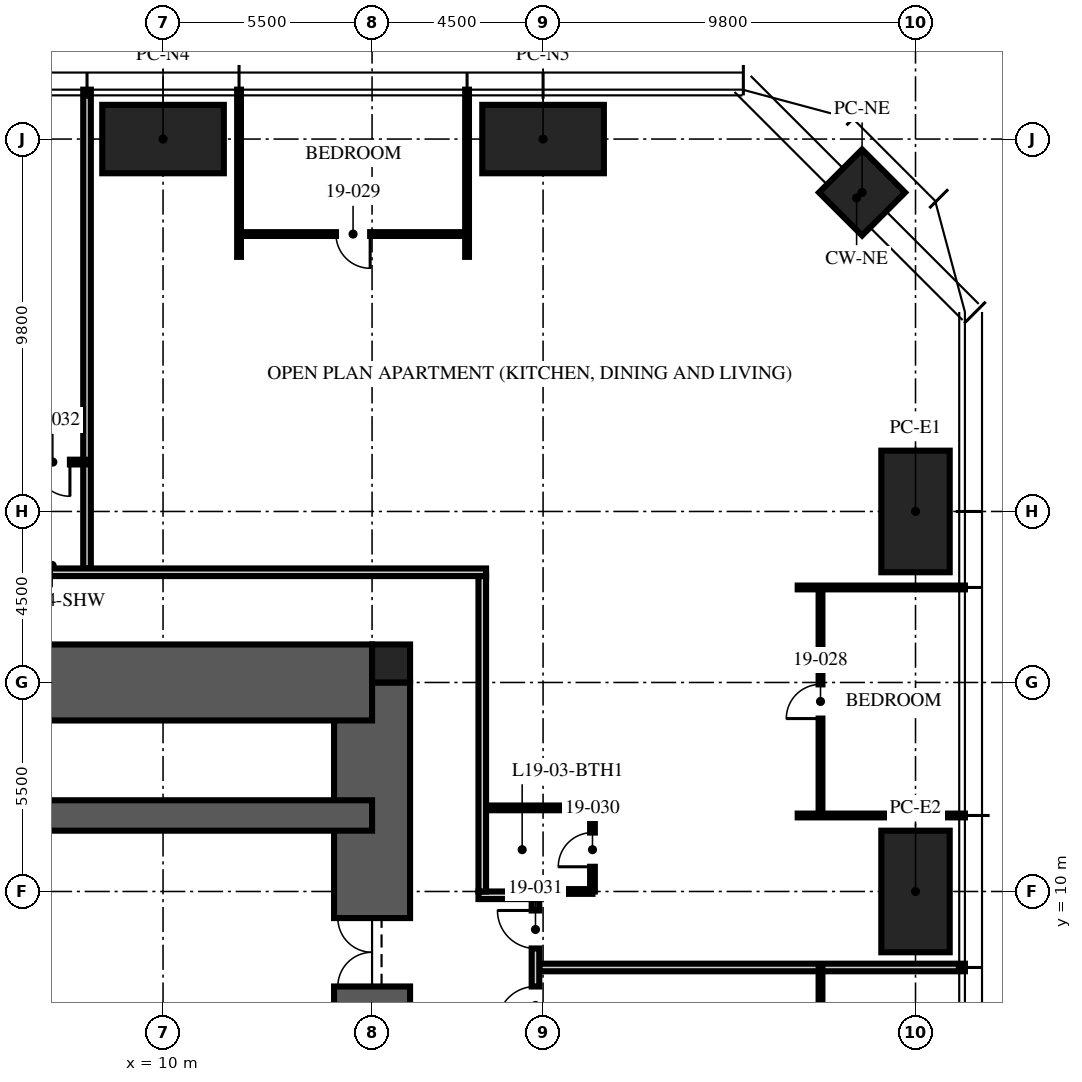
"""IFC4 building model, lengths in metres.
Left out: names, types, materials, properties, quantities, classifications, styles, units other than length and angle.
Written with IfcOpenShell. Run it as: python <this file> out.ifc"""

import sys

from ifc_helpers import new_model, si_unit, direction, frame, frame_2d, origin, origin_2d, place, context, subcontext, project, spatial, rectangle, hollow_rectangle, extrude, element, fill, save


model = new_model("IFC4")
c1 = context("Model", 3, precision=1e-05, world=origin(), true_north=direction((0.0, 1.0)))
c2 = subcontext(c1, "Body", "Model", "MODEL_VIEW")
j1 = project(units=[si_unit("LENGTHUNIT", "METRE"), si_unit("PLANEANGLEUNIT", "RADIAN")], contexts=[c1])
p1 = place(None, origin())
s1 = spatial("IfcSite", under=j1, at=p1, CompositionType="ELEMENT")
p2 = place(p1, origin())
s2 = spatial("IfcBuilding", under=s1, at=p2, CompositionType="ELEMENT")
p3 = place(p2, frame((0.0, 0.0, 77.25)))
s3 = spatial("IfcBuildingStorey", under=s2, at=p3, CompositionType="ELEMENT", Elevation=77.25)
p4 = place(p3, frame((15.5, -15.5, -0.25), z_axis=(0.0, 0.0, 1.0), x_axis=(0.0, 1.0, 0.0)))
e1 = element("IfcWall", 1, at=p4, inside=s3, PredefinedType="SHEAR", context=c2, shape_type="SweptSolid", body=[
    extrude(rectangle(XDim=31.0, YDim=2.0, at=frame_2d((15.5, 0.0))), origin(), (0.0, 0.0, 1.0), 3.75),
])
p5 = place(p4, frame((6.5, 0.0, 0.25)))
e2 = element("IfcOpeningElement", 2, at=p5, cuts=e1, PredefinedType="OPENING", context=c2, shape_type="SweptSolid", body=[
    extrude(rectangle(XDim=1.2, YDim=2.1, at=frame_2d((0.6, 1.05))), frame((0.0, 1.01, 0.0), z_axis=(0.0, -1.0, 0.0), x_axis=(1.0, 0.0, 0.0)), (0.0, 0.0, 1.0), 2.02),
])
p6 = place(p4, frame((23.0, 0.0, 0.25)))
e3 = element("IfcOpeningElement", 3, at=p6, cuts=e1, PredefinedType="OPENING", context=c2, shape_type="SweptSolid", body=[
    extrude(rectangle(XDim=1.8, YDim=2.1, at=frame_2d((0.9, 1.05))), frame((0.0, 1.01, 0.0), z_axis=(0.0, -1.0, 0.0), x_axis=(1.0, 0.0, 0.0)), (0.0, 0.0, 1.0), 2.02),
])
p7 = place(p3, frame((-15.5, 15.5, -0.25), z_axis=(0.0, 0.0, 1.0), x_axis=(1.0, 0.0, 0.0)))
e4 = element("IfcWall", 4, at=p7, inside=s3, PredefinedType="SHEAR", context=c2, shape_type="SweptSolid", body=[
    extrude(rectangle(XDim=31.0, YDim=2.0, at=frame_2d((15.5, 0.0))), origin(), (0.0, 0.0, 1.0), 3.75),
])
p8 = place(p7, frame((10.4, 0.0, 0.25)))
e5 = element("IfcOpeningElement", 5, at=p8, cuts=e4, PredefinedType="OPENING", context=c2, shape_type="SweptSolid", body=[
    extrude(rectangle(XDim=1.1, YDim=2.1, at=frame_2d((0.55, 1.05))), frame((0.0, 1.01, 0.0), z_axis=(0.0, -1.0, 0.0), x_axis=(1.0, 0.0, 0.0)), (0.0, 0.0, 1.0), 2.02),
])
p9 = place(p7, frame((13.5, 0.0, 0.25)))
e6 = element("IfcOpeningElement", 6, at=p9, cuts=e4, PredefinedType="OPENING", context=c2, shape_type="SweptSolid", body=[
    extrude(rectangle(XDim=1.1, YDim=2.1, at=frame_2d((0.55, 1.05))), frame((0.0, 1.01, 0.0), z_axis=(0.0, -1.0, 0.0), x_axis=(1.0, 0.0, 0.0)), (0.0, 0.0, 1.0), 2.02),
])
p10 = place(p7, frame((16.6, 0.0, 0.25)))
e7 = element("IfcOpeningElement", 7, at=p10, cuts=e4, PredefinedType="OPENING", context=c2, shape_type="SweptSolid", body=[
    extrude(rectangle(XDim=1.1, YDim=2.1, at=frame_2d((0.55, 1.05))), frame((0.0, 1.01, 0.0), z_axis=(0.0, -1.0, 0.0), x_axis=(1.0, 0.0, 0.0)), (0.0, 0.0, 1.0), 2.02),
])
p11 = place(p3, frame((-15.5, 12.0, -0.25), z_axis=(0.0, 0.0, 1.0), x_axis=(1.0, 0.0, 0.0)))
e8 = element("IfcWall", 8, at=p11, inside=s3, PredefinedType="SHEAR", context=c2, shape_type="SweptSolid", body=[
    extrude(rectangle(XDim=31.0, YDim=0.8, at=frame_2d((15.5, 0.0))), origin(), (0.0, 0.0, 1.0), 3.75),
])
p12 = place(p3, frame((16.0, 16.0, -0.25), z_axis=(0.0, 0.0, 1.0), x_axis=(1.0, 0.0, 0.0)))
e9 = element("IfcColumn", 9, at=p12, inside=s3, PredefinedType="COLUMN", context=c2, shape_type="SweptSolid", body=[
    extrude(rectangle(XDim=1.0, YDim=1.0, at=origin_2d()), origin(), (0.0, 0.0, 1.0), 3.75),
])
for number, where, z_axis, x_axis in (
    (10, (10.0, 29.8, 0.0), (0.0, 0.0, 1.0), (1.0, 0.0, 0.0)),
    (11, (20.0, 29.8, 0.0), (0.0, 0.0, 1.0), (1.0, 0.0, 0.0)),
    (12, (29.8, 20.0, 0.0), (0.0, 0.0, 1.0), (0.0, 1.0, 0.0)),
    (13, (29.8, 10.0, 0.0), (0.0, 0.0, 1.0), (0.0, 1.0, 0.0)),
):
    element("IfcColumn", number, at=place(p3, frame(where, z_axis=z_axis, x_axis=x_axis)), inside=s3, PredefinedType="COLUMN", context=c2, shape_type="SweptSolid", body=[
        extrude(hollow_rectangle(XDim=3.2, YDim=1.8, WallThickness=0.2, at=origin_2d()), origin(), (0.0, 0.0, 1.0), 3.75),
    ])
p13 = place(p3, frame((28.394, 28.394, 0.0), z_axis=(0.0, 0.0, 1.0), x_axis=(0.707106781187, -0.707106781187, 0.0)))
e14 = element("IfcColumn", 14, at=p13, inside=s3, PredefinedType="COLUMN", context=c2, shape_type="SweptSolid", body=[
    extrude(hollow_rectangle(XDim=1.6, YDim=1.6, WallThickness=0.1, at=origin_2d()), origin(), (0.0, 0.0, 1.0), 3.75),
])
p14 = place(p3, frame((19.9, 8.0, 0.0), z_axis=(0.0, 0.0, 1.0), x_axis=(1.0, 0.0, 0.0)))
e15 = element("IfcWall", 15, at=p14, inside=s3, PredefinedType="PARTITIONING", context=c2, shape_type="SweptSolid", body=[
    extrude(rectangle(XDim=11.2, YDim=0.2, at=frame_2d((5.6, 0.0))), origin(), (0.0, 0.0, 1.0), 2.71),
])
for number, where, z_axis, x_axis in (
    (16, (26.7, 12.0, 0.0), (0.0, 0.0, 1.0), (1.0, 0.0, 0.0)),
    (17, (26.7, 18.0, 0.0), (0.0, 0.0, 1.0), (1.0, 0.0, 0.0)),
    (18, (18.0, 26.7, 0.0), (0.0, 0.0, 1.0), (0.0, 1.0, 0.0)),
    (19, (12.0, 26.7, 0.0), (0.0, 0.0, 1.0), (0.0, 1.0, 0.0)),
):
    element("IfcWall", number, at=place(p3, frame(where, z_axis=z_axis, x_axis=x_axis)), inside=s3, PredefinedType="PARTITIONING", context=c2, shape_type="SweptSolid", body=[
        extrude(rectangle(XDim=4.4, YDim=0.1, at=frame_2d((2.2, 0.0))), origin(), (0.0, 0.0, 1.0), 2.71),
    ])
p15 = place(p3, frame((8.0, 18.5, 0.0), z_axis=(0.0, 0.0, 1.0), x_axis=(0.0, 1.0, 0.0)))
e20 = element("IfcWall", 20, at=p15, inside=s3, PredefinedType="PARTITIONING", context=c2, shape_type="SweptSolid", body=[
    extrude(rectangle(XDim=12.6, YDim=0.2, at=frame_2d((6.3, 0.0))), origin(), (0.0, 0.0, 1.0), 2.71),
])
p16 = place(p3, frame((27.3, 2.0, 0.0), z_axis=(0.0, 0.0, 1.0), x_axis=(0.0, 1.0, 0.0)))
e21 = element("IfcWall", 21, at=p16, inside=s3, PredefinedType="PARTITIONING", context=c2, shape_type="SweptSolid", body=[
    extrude(rectangle(XDim=6.0, YDim=0.1, at=frame_2d((3.0, 0.0))), origin(), (0.0, 0.0, 1.0), 2.61),
])
p17 = place(p16, frame((2.55, 0.0, 0.0)))
e22 = element("IfcOpeningElement", 22, at=p17, cuts=e21, PredefinedType="OPENING", context=c2, shape_type="SweptSolid", body=[
    extrude(rectangle(XDim=0.9, YDim=2.1, at=frame_2d((0.45, 1.05))), frame((0.0, 0.06, 0.0), z_axis=(0.0, -1.0, 0.0), x_axis=(1.0, 0.0, 0.0)), (0.0, 0.0, 1.0), 0.12),
])
p18 = place(p3, frame((27.3, 12.0, 0.0), z_axis=(0.0, 0.0, 1.0), x_axis=(0.0, 1.0, 0.0)))
e23 = element("IfcWall", 23, at=p18, inside=s3, PredefinedType="PARTITIONING", context=c2, shape_type="SweptSolid", body=[
    extrude(rectangle(XDim=6.0, YDim=0.1, at=frame_2d((3.0, 0.0))), origin(), (0.0, 0.0, 1.0), 2.61),
])
p19 = place(p18, frame((2.55, 0.0, 0.0)))
e24 = element("IfcOpeningElement", 24, at=p19, cuts=e23, PredefinedType="OPENING", context=c2, shape_type="SweptSolid", body=[
    extrude(rectangle(XDim=0.9, YDim=2.1, at=frame_2d((0.45, 1.05))), frame((0.0, 0.06, 0.0), z_axis=(0.0, -1.0, 0.0), x_axis=(1.0, 0.0, 0.0)), (0.0, 0.0, 1.0), 0.12),
])
p20 = place(p3, frame((18.0, 27.3, 0.0), z_axis=(0.0, 0.0, 1.0), x_axis=(-1.0, 0.0, 0.0)))
e25 = element("IfcWall", 25, at=p20, inside=s3, PredefinedType="PARTITIONING", context=c2, shape_type="SweptSolid", body=[
    extrude(rectangle(XDim=6.0, YDim=0.1, at=frame_2d((3.0, 0.0))), origin(), (0.0, 0.0, 1.0), 2.61),
])
p21 = place(p20, frame((2.55, 0.0, 0.0)))
e26 = element("IfcOpeningElement", 26, at=p21, cuts=e25, PredefinedType="OPENING", context=c2, shape_type="SweptSolid", body=[
    extrude(rectangle(XDim=0.9, YDim=2.1, at=frame_2d((0.45, 1.05))), frame((0.0, 0.06, 0.0), z_axis=(0.0, -1.0, 0.0), x_axis=(1.0, 0.0, 0.0)), (0.0, 0.0, 1.0), 0.12),
])
p22 = place(p3, frame((21.3, 10.0, 0.0), z_axis=(0.0, 0.0, 1.0), x_axis=(0.0, 1.0, 0.0)))
e27 = element("IfcWall", 27, at=p22, inside=s3, PredefinedType="PARTITIONING", context=c2, shape_type="SweptSolid", body=[
    extrude(rectangle(XDim=2.2, YDim=0.125, at=frame_2d((1.1, 0.0))), origin(), (0.0, 0.0, 1.0), 2.492),
])
p23 = place(p22, frame((0.65, 0.0, 0.0)))
e28 = element("IfcOpeningElement", 28, at=p23, cuts=e27, PredefinedType="OPENING", context=c2, shape_type="SweptSolid", body=[
    extrude(rectangle(XDim=0.9, YDim=2.1, at=frame_2d((0.45, 1.05))), frame((0.0, 0.073, 0.0), z_axis=(0.0, -1.0, 0.0), x_axis=(1.0, 0.0, 0.0)), (0.0, 0.0, 1.0), 0.145),
])
p24 = place(p3, frame((19.97, 10.0, 0.0), z_axis=(0.0, 0.0, 1.0), x_axis=(1.0, 0.0, 0.0)))
e29 = element("IfcWall", 29, at=p24, inside=s3, PredefinedType="PARTITIONING", context=c2, shape_type="SweptSolid", body=[
    extrude(rectangle(XDim=1.33, YDim=0.125, at=frame_2d((0.665, 0.0))), origin(), (0.0, 0.0, 1.0), 2.492),
])
p25 = place(p3, frame((18.5, 12.2, 0.0), z_axis=(0.0, 0.0, 1.0), x_axis=(1.0, 0.0, 0.0)))
e30 = element("IfcWall", 30, at=p25, inside=s3, PredefinedType="PARTITIONING", context=c2, shape_type="SweptSolid", body=[
    extrude(rectangle(XDim=2.8, YDim=0.125, at=frame_2d((1.4, 0.0))), origin(), (0.0, 0.0, 1.0), 3.5),
])
p26 = place(p3, frame((8.0, 21.3, 0.0), z_axis=(0.0, 0.0, 1.0), x_axis=(-1.0, 0.0, 0.0)))
e31 = element("IfcWall", 31, at=p26, inside=s3, PredefinedType="PARTITIONING", context=c2, shape_type="SweptSolid", body=[
    extrude(rectangle(XDim=1.8, YDim=0.125, at=frame_2d((0.9, 0.0))), origin(), (0.0, 0.0, 1.0), 3.5),
])
p27 = place(p26, frame((0.45, 0.0, 0.0)))
e32 = element("IfcOpeningElement", 32, at=p27, cuts=e31, PredefinedType="OPENING", context=c2, shape_type="SweptSolid", body=[
    extrude(rectangle(XDim=0.9, YDim=2.1, at=frame_2d((0.45, 1.05))), frame((0.0, 0.073, 0.0), z_axis=(0.0, -1.0, 0.0), x_axis=(1.0, 0.0, 0.0)), (0.0, 0.0, 1.0), 0.145),
])
p28 = place(p3, frame((18.3, 9.9, 0.0), z_axis=(0.0, 0.0, 1.0), x_axis=(1.0, 0.0, 0.0)))
e33 = element("IfcWall", 33, at=p28, inside=s3, PredefinedType="PARTITIONING", context=c2, shape_type="SweptSolid", body=[
    extrude(rectangle(XDim=1.6, YDim=0.2, at=frame_2d((0.8, 0.0))), origin(), (0.0, 0.0, 1.0), 2.492),
])
p29 = place(p3, frame((19.8, 6.2, 0.0), z_axis=(0.0, 0.0, 1.0), x_axis=(0.0, 1.0, 0.0)))
e34 = element("IfcWall", 34, at=p29, inside=s3, PredefinedType="PARTITIONING", context=c2, shape_type="SweptSolid", body=[
    extrude(rectangle(XDim=3.6, YDim=0.2, at=frame_2d((1.8, 0.0))), origin(), (0.0, 0.0, 1.0), 3.5),
])
p30 = place(p29, frame((0.3, 0.0, 0.0)))
e35 = element("IfcOpeningElement", 35, at=p30, cuts=e34, PredefinedType="OPENING", context=c2, shape_type="SweptSolid", body=[
    extrude(rectangle(XDim=1.0, YDim=2.2, at=frame_2d((0.5, 1.1))), frame((0.0, 0.11, 0.0), z_axis=(0.0, -1.0, 0.0), x_axis=(1.0, 0.0, 0.0)), (0.0, 0.0, 1.0), 0.22),
])
p31 = place(p29, frame((2.3, 0.0, 0.0)))
e36 = element("IfcOpeningElement", 36, at=p31, cuts=e34, PredefinedType="OPENING", context=c2, shape_type="SweptSolid", body=[
    extrude(rectangle(XDim=1.0, YDim=2.2, at=frame_2d((0.5, 1.1))), frame((0.0, 0.11, 0.0), z_axis=(0.0, -1.0, 0.0), x_axis=(1.0, 0.0, 0.0)), (0.0, 0.0, 1.0), 0.22),
])
p32 = place(p3, frame((18.4, 10.0, 0.0), z_axis=(0.0, 0.0, 1.0), x_axis=(0.0, 1.0, 0.0)))
e37 = element("IfcWall", 37, at=p32, inside=s3, PredefinedType="PARTITIONING", context=c2, shape_type="SweptSolid", body=[
    extrude(rectangle(XDim=8.3, YDim=0.2, at=frame_2d((4.15, 0.0))), origin(), (0.0, 0.0, 1.0), 2.3),
])
p33 = place(p3, frame((-18.5, 18.4, 0.0), z_axis=(0.0, 0.0, 1.0), x_axis=(1.0, 0.0, 0.0)))
e38 = element("IfcWall", 38, at=p33, inside=s3, PredefinedType="PARTITIONING", context=c2, shape_type="SweptSolid", body=[
    extrude(rectangle(XDim=37.0, YDim=0.2, at=frame_2d((18.5, 0.0))), origin(), (0.0, 0.0, 1.0), 2.3),
])
p34 = place(p33, frame((20.93, 0.0, 0.0)))
e39 = element("IfcOpeningElement", 39, at=p34, cuts=e38, PredefinedType="OPENING", context=c2, shape_type="SweptSolid", body=[
    extrude(rectangle(XDim=1.0, YDim=2.2, at=frame_2d((0.5, 1.1))), frame((0.0, 0.11, 0.0), z_axis=(0.0, -1.0, 0.0), x_axis=(1.0, 0.0, 0.0)), (0.0, 0.0, 1.0), 0.22),
])
p35 = place(p33, frame((0.98, 0.0, 0.0)))
e40 = element("IfcOpeningElement", 40, at=p35, cuts=e38, PredefinedType="OPENING", context=c2, shape_type="SweptSolid", body=[
    extrude(rectangle(XDim=1.0, YDim=2.2, at=frame_2d((0.5, 1.1))), frame((0.0, 0.11, 0.0), z_axis=(0.0, -1.0, 0.0), x_axis=(1.0, 0.0, 0.0)), (0.0, 0.0, 1.0), 0.22),
])
p36 = place(p6, origin())
e41 = element("IfcDoor", 41, at=p36, inside=s3, OperationType="DOUBLE_DOOR_SINGLE_SWING", PredefinedType="DOOR", context=c2, shape_type="SweptSolid", body=[
    extrude(rectangle(XDim=1.8, YDim=2.1, at=frame_2d((0.9, 1.05))), frame((0.0, 0.025, 0.0), z_axis=(0.0, -1.0, 0.0), x_axis=(1.0, 0.0, 0.0)), (0.0, 0.0, 1.0), 0.05),
])
fill(e3, e41)
p37 = place(p30, origin())
e42 = element("IfcDoor", 42, at=p37, inside=s3, OperationType="SINGLE_SWING_LEFT", PredefinedType="DOOR", context=c2, shape_type="SweptSolid", body=[
    extrude(rectangle(XDim=1.0, YDim=2.2, at=frame_2d((0.5, 1.1))), frame((0.0, 0.025, 0.0), z_axis=(0.0, -1.0, 0.0), x_axis=(1.0, 0.0, 0.0)), (0.0, 0.0, 1.0), 0.05),
])
fill(e35, e42)
p38 = place(p19, origin())
e43 = element("IfcDoor", 43, at=p38, inside=s3, OperationType="SINGLE_SWING_LEFT", PredefinedType="DOOR", context=c2, shape_type="SweptSolid", body=[
    extrude(rectangle(XDim=0.9, YDim=2.1, at=frame_2d((0.45, 1.05))), frame((0.0, 0.025, 0.0), z_axis=(0.0, -1.0, 0.0), x_axis=(1.0, 0.0, 0.0)), (0.0, 0.0, 1.0), 0.05),
])
fill(e24, e43)
p39 = place(p21, origin())
e44 = element("IfcDoor", 44, at=p39, inside=s3, OperationType="SINGLE_SWING_LEFT", PredefinedType="DOOR", context=c2, shape_type="SweptSolid", body=[
    extrude(rectangle(XDim=0.9, YDim=2.1, at=frame_2d((0.45, 1.05))), frame((0.0, 0.025, 0.0), z_axis=(0.0, -1.0, 0.0), x_axis=(1.0, 0.0, 0.0)), (0.0, 0.0, 1.0), 0.05),
])
fill(e26, e44)
p40 = place(p23, origin())
e45 = element("IfcDoor", 45, at=p40, inside=s3, OperationType="SINGLE_SWING_LEFT", PredefinedType="DOOR", context=c2, shape_type="SweptSolid", body=[
    extrude(rectangle(XDim=0.9, YDim=2.1, at=frame_2d((0.45, 1.05))), frame((0.0, 0.025, 0.0), z_axis=(0.0, -1.0, 0.0), x_axis=(1.0, 0.0, 0.0)), (0.0, 0.0, 1.0), 0.05),
])
fill(e28, e45)
p41 = place(p31, origin())
e46 = element("IfcDoor", 46, at=p41, inside=s3, OperationType="SINGLE_SWING_RIGHT", PredefinedType="DOOR", context=c2, shape_type="SweptSolid", body=[
    extrude(rectangle(XDim=1.0, YDim=2.2, at=frame_2d((0.5, 1.1))), frame((0.0, 0.025, 0.0), z_axis=(0.0, -1.0, 0.0), x_axis=(1.0, 0.0, 0.0)), (0.0, 0.0, 1.0), 0.05),
])
fill(e36, e46)
p42 = place(p27, origin())
e47 = element("IfcDoor", 47, at=p42, inside=s3, OperationType="SINGLE_SWING_LEFT", PredefinedType="DOOR", context=c2, shape_type="SweptSolid", body=[
    extrude(rectangle(XDim=0.9, YDim=2.1, at=frame_2d((0.45, 1.05))), frame((0.0, 0.025, 0.0), z_axis=(0.0, -1.0, 0.0), x_axis=(1.0, 0.0, 0.0)), (0.0, 0.0, 1.0), 0.05),
])
fill(e32, e47)
save(model, sys.argv[1])
